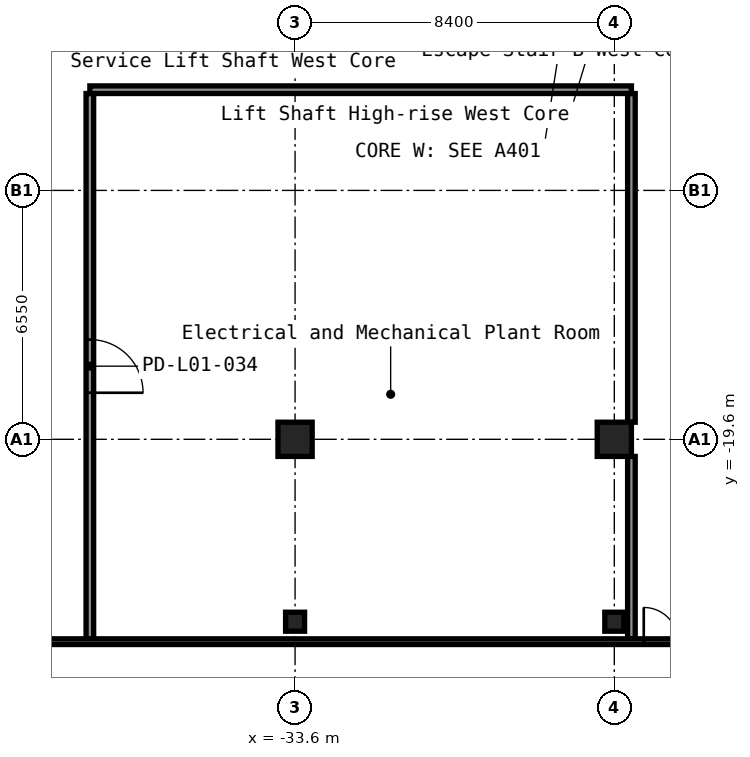
"""IFC4 building model, lengths in metres.
Left out: names, types, materials, properties, quantities, classifications, styles, units other than length and angle.
Written with IfcOpenShell. Run it as: python <this file> out.ifc"""

import sys

from ifc_helpers import new_model, si_unit, direction, frame, frame_2d, origin, origin_2d, place, context, subcontext, project, spatial, rectangle, hollow_rectangle, extrude, element, fill, save


model = new_model("IFC4")
c1 = context("Model", 3, precision=1e-05, world=origin(), true_north=direction((0.0, 1.0)))
c2 = subcontext(c1, "Body", "Model", "MODEL_VIEW")
j1 = project(units=[si_unit("LENGTHUNIT", "METRE"), si_unit("PLANEANGLEUNIT", "RADIAN")], contexts=[c1])
p1 = place(None, origin())
s1 = spatial("IfcSite", under=j1, at=p1, CompositionType="ELEMENT")
p2 = place(p1, origin())
s2 = spatial("IfcBuilding", under=s1, at=p2, CompositionType="ELEMENT")
p3 = place(p2, origin())
s3 = spatial("IfcBuildingStorey", under=s2, at=p3, CompositionType="ELEMENT", Elevation=0.0)
for number, where, z_axis, x_axis in (
    (1, (-33.6, -19.6, -0.3), (0.0, 0.0, 1.0), (1.0, 0.0, 0.0)),
    (2, (-25.2, -19.6, -0.3), (0.0, 0.0, 1.0), (1.0, 0.0, 0.0)),
):
    element("IfcColumn", number, at=place(p3, frame(where, z_axis=z_axis, x_axis=x_axis)), inside=s3, PredefinedType="COLUMN", context=c2, shape_type="SweptSolid", body=[
        extrude(hollow_rectangle(XDim=0.9, YDim=0.9, WallThickness=0.036, at=origin_2d()), origin(), (0.0, 0.0, 1.0), 8.9),
    ])
for number, where, z_axis, x_axis in (
    (3, (-33.6, -24.4, -0.3), (0.0, 0.0, 1.0), (1.0, 0.0, 0.0)),
    (4, (-25.2, -24.4, -0.3), (0.0, 0.0, 1.0), (1.0, 0.0, 0.0)),
):
    element("IfcColumn", number, at=place(p3, frame(where, z_axis=z_axis, x_axis=x_axis)), inside=s3, PredefinedType="COLUMN", context=c2, shape_type="SweptSolid", body=[
        extrude(hollow_rectangle(XDim=0.5, YDim=0.5, WallThickness=0.019, InnerFilletRadius=0.029, OuterFilletRadius=0.048, at=origin_2d()), origin(), (0.0, 0.0, 1.0), 8.9),
    ])
p4 = place(p3, frame((-39.0, -10.5, 0.0), z_axis=(0.0, 0.0, 1.0), x_axis=(0.0, -1.0, 0.0)))
e5 = element("IfcWall", 5, at=p4, inside=s3, PredefinedType="PARTITIONING", context=c2, shape_type="SweptSolid", body=[
    extrude(rectangle(XDim=14.35, YDim=0.2, at=frame_2d((7.175, 0.0))), origin(), (0.0, 0.0, 1.0), 8.6),
])
p5 = place(p4, frame((6.475, 0.0, 0.0)))
e6 = element("IfcOpeningElement", 6, at=p5, cuts=e5, PredefinedType="OPENING", context=c2, shape_type="SweptSolid", body=[
    extrude(rectangle(XDim=1.4, YDim=2.1, at=frame_2d((0.7, 1.05))), frame((0.0, 0.11, 0.0), z_axis=(0.0, -1.0, 0.0), x_axis=(1.0, 0.0, 0.0)), (0.0, 0.0, 1.0), 0.22),
])
p6 = place(p3, frame((-24.75, -24.85, 0.0), z_axis=(0.0, 0.0, 1.0), x_axis=(0.0, 1.0, 0.0)))
e7 = element("IfcWall", 7, at=p6, inside=s3, PredefinedType="PARTITIONING", context=c2, shape_type="SweptSolid", body=[
    extrude(rectangle(XDim=4.8, YDim=0.2, at=frame_2d((2.4, 0.0))), origin(), (0.0, 0.0, 1.0), 8.6),
])
p7 = place(p3, frame((-24.75, -19.15, 0.0), z_axis=(0.0, 0.0, 1.0), x_axis=(0.0, 1.0, 0.0)))
e8 = element("IfcWall", 8, at=p7, inside=s3, PredefinedType="PARTITIONING", context=c2, shape_type="SweptSolid", body=[
    extrude(rectangle(XDim=8.65, YDim=0.2, at=frame_2d((4.325, 0.0))), origin(), (0.0, 0.0, 1.0), 8.6),
])
p8 = place(p3, frame((-24.75, -10.4, 0.0), z_axis=(0.0, 0.0, 1.0), x_axis=(-1.0, 0.0, 0.0)))
e9 = element("IfcWall", 9, at=p8, inside=s3, PredefinedType="PARTITIONING", context=c2, shape_type="SweptSolid", body=[
    extrude(rectangle(XDim=14.25, YDim=0.2, at=frame_2d((7.125, 0.0))), origin(), (0.0, 0.0, 1.0), 8.6),
])
p9 = place(p3, frame((-8.4, -24.925, 0.0), z_axis=(0.0, 0.0, 1.0), x_axis=(-1.0, 0.0, 0.0)))
e10 = element("IfcWall", 10, at=p9, inside=s3, PredefinedType="STANDARD", context=c2, shape_type="SweptSolid", body=[
    extrude(rectangle(XDim=43.58, YDim=0.15, at=frame_2d((21.79, 0.0))), origin(), (0.0, 0.0, 1.0), 8.6),
])
p10 = place(p9, frame((33.9, 0.0, 0.0)))
e11 = element("IfcOpeningElement", 11, at=p10, cuts=e10, PredefinedType="OPENING", context=c2, shape_type="SweptSolid", body=[
    extrude(rectangle(XDim=1.4, YDim=2.1, at=frame_2d((0.7, 1.05))), frame((0.0, 0.085, 0.0), z_axis=(0.0, -1.0, 0.0), x_axis=(1.0, 0.0, 0.0)), (0.0, 0.0, 1.0), 0.17),
])
p11 = place(p9, frame((14.225, 0.0, 0.0)))
e12 = element("IfcOpeningElement", 12, at=p11, cuts=e10, PredefinedType="OPENING", context=c2, shape_type="SweptSolid", body=[
    extrude(rectangle(XDim=1.8, YDim=2.1, at=frame_2d((0.9, 1.05))), frame((0.0, 0.085, 0.0), z_axis=(0.0, -1.0, 0.0), x_axis=(1.0, 0.0, 0.0)), (0.0, 0.0, 1.0), 0.17),
])
p12 = place(p5, origin())
e13 = element("IfcDoor", 13, at=p12, inside=s3, OperationType="SINGLE_SWING_LEFT", PredefinedType="DOOR", context=c2, shape_type="SweptSolid", body=[
    extrude(rectangle(XDim=1.4, YDim=2.1, at=frame_2d((0.7, 1.05))), frame((0.0, 0.025, 0.0), z_axis=(0.0, -1.0, 0.0), x_axis=(1.0, 0.0, 0.0)), (0.0, 0.0, 1.0), 0.05),
])
fill(e6, e13)
p13 = place(p11, origin())
e14 = element("IfcDoor", 14, at=p13, inside=s3, OperationType="DOUBLE_DOOR_SINGLE_SWING", PredefinedType="DOOR", context=c2, shape_type="SweptSolid", body=[
    extrude(rectangle(XDim=1.8, YDim=2.1, at=frame_2d((0.9, 1.05))), frame((0.0, 0.025, 0.0), z_axis=(0.0, -1.0, 0.0), x_axis=(1.0, 0.0, 0.0)), (0.0, 0.0, 1.0), 0.05),
])
fill(e12, e14)
save(model, sys.argv[1])
